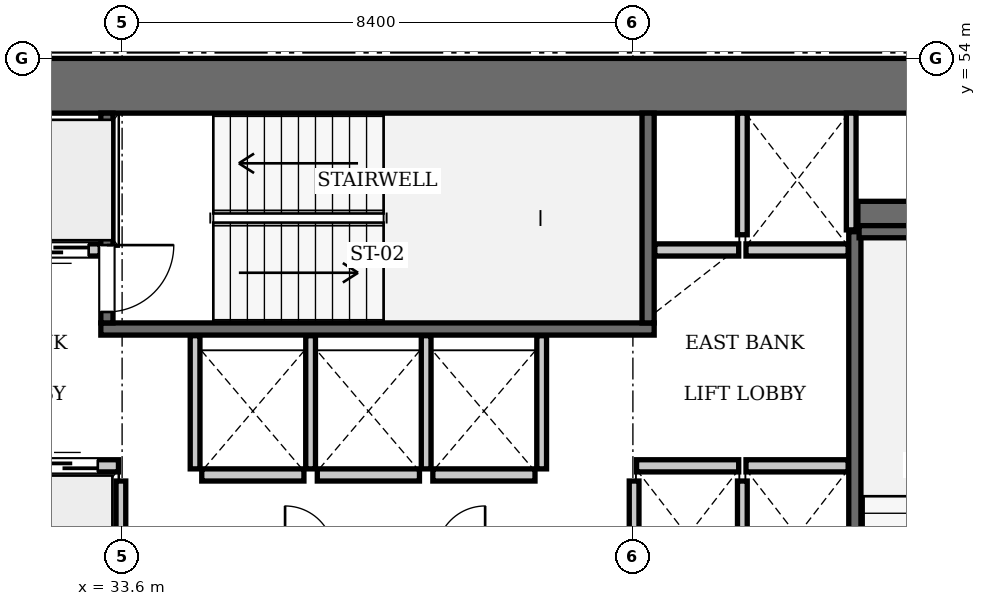
"""IFC4 building model, lengths in metres.
Left out: names, types, materials, properties, quantities, classifications, styles, units other than length and angle.
Written with IfcOpenShell. Run it as: python <this file> out.ifc"""

import sys

from ifc_helpers import new_model, si_unit, direction, frame, frame_2d, origin, place, context, subcontext, project, spatial, rectangle, extrude, element, fill, save


model = new_model("IFC4")
c1 = context("Model", 3, precision=1e-05, world=origin(), true_north=direction((0.0, 1.0)))
c2 = subcontext(c1, "Body", "Model", "MODEL_VIEW")
j1 = project(units=[si_unit("LENGTHUNIT", "METRE"), si_unit("PLANEANGLEUNIT", "RADIAN")], contexts=[c1])
p1 = place(None, origin())
s1 = spatial("IfcSite", under=j1, at=p1, CompositionType="ELEMENT")
p2 = place(p1, origin())
s2 = spatial("IfcBuilding", under=s1, at=p2, CompositionType="ELEMENT")
p3 = place(p2, frame((0.0, 0.0, 107.8)))
s3 = spatial("IfcBuildingStorey", under=s2, at=p3, CompositionType="ELEMENT", Elevation=107.8)
p4 = place(p3, frame((25.2, 53.55, 0.0), z_axis=(0.0, 0.0, 1.0), x_axis=(1.0, 0.0, 0.0)))
e1 = element("IfcWall", 1, at=p4, inside=s3, PredefinedType="SHEAR", context=c2, shape_type="SweptSolid", body=[
    extrude(rectangle(XDim=25.2, YDim=0.9, at=frame_2d((12.6, 0.0))), origin(), (0.0, 0.0, 1.0), 3.85),
])
p5 = place(p3, frame((45.7, 51.4, 0.0), z_axis=(0.0, 0.0, 1.0), x_axis=(1.0, 0.0, 0.0)))
e2 = element("IfcWall", 2, at=p5, inside=s3, PredefinedType="SHEAR", context=c2, shape_type="SweptSolid", body=[
    extrude(rectangle(XDim=3.8, YDim=0.5, at=frame_2d((1.9, 0.0))), origin(), (0.0, 0.0, 1.0), 3.85),
])
p6 = place(p3, frame((33.25, 49.55, 0.0), z_axis=(0.0, 0.0, 1.0), x_axis=(1.0, 0.0, 0.0)))
e3 = element("IfcWall", 3, at=p6, inside=s3, PredefinedType="SOLIDWALL", context=c2, shape_type="SweptSolid", body=[
    extrude(rectangle(XDim=9.1, YDim=0.2, at=frame_2d((4.55, 0.0))), origin(), (0.0, 0.0, 1.0), 3.61),
])
p7 = place(p3, frame((42.25, 49.65, 0.0), z_axis=(0.0, 0.0, 1.0), x_axis=(0.0, 1.0, 0.0)))
e4 = element("IfcWall", 4, at=p7, inside=s3, PredefinedType="SOLIDWALL", context=c2, shape_type="SweptSolid", body=[
    extrude(rectangle(XDim=3.45, YDim=0.2, at=frame_2d((1.725, 0.0))), origin(), (0.0, 0.0, 1.0), 3.61),
])
p8 = place(p3, frame((33.35, 49.65, 0.0), z_axis=(0.0, 0.0, 1.0), x_axis=(0.0, 1.0, 0.0)))
e5 = element("IfcWall", 5, at=p8, inside=s3, PredefinedType="SOLIDWALL", context=c2, shape_type="SweptSolid", body=[
    extrude(rectangle(XDim=3.45, YDim=0.2, at=frame_2d((1.725, 0.0))), origin(), (0.0, 0.0, 1.0), 3.61),
])
p9 = place(p8, frame((0.18, 0.0, 0.0)))
e6 = element("IfcOpeningElement", 6, at=p9, cuts=e5, PredefinedType="OPENING", context=c2, shape_type="SweptSolid", body=[
    extrude(rectangle(XDim=1.1, YDim=2.15, at=frame_2d((0.55, 1.075))), frame((0.0, 0.11, 0.0), z_axis=(0.0, -1.0, 0.0), x_axis=(1.0, 0.0, 0.0)), (0.0, 0.0, 1.0), 0.22),
])
p10 = place(p3, frame((45.65, 42.3, 0.0), z_axis=(0.0, 0.0, 1.0), x_axis=(0.0, 1.0, 0.0)))
e7 = element("IfcWall", 7, at=p10, inside=s3, PredefinedType="SOLIDWALL", context=c2, shape_type="SweptSolid", body=[
    extrude(rectangle(XDim=8.85, YDim=0.2, at=frame_2d((4.425, 0.0))), origin(), (0.0, 0.0, 1.0), 3.61),
])
p11 = place(p3, frame((45.72, 51.15, 0.0), z_axis=(0.0, 0.0, 1.0), x_axis=(1.0, 0.0, 0.0)))
e8 = element("IfcWall", 8, at=p11, inside=s3, PredefinedType="SOLIDWALL", context=c2, shape_type="SweptSolid", body=[
    extrude(rectangle(XDim=3.5, YDim=0.2, at=frame_2d((1.75, 0.0))), origin(), (0.0, 0.0, 1.0), 3.61),
])
p12 = place(p3, frame((31.86, 47.3, 0.0), z_axis=(0.0, 0.0, 1.0), x_axis=(1.0, 0.0, 0.0)))
e9 = element("IfcWall", 9, at=p12, inside=s3, PredefinedType="SOLIDWALL", context=c2, shape_type="SweptSolid", body=[
    extrude(rectangle(XDim=1.68, YDim=0.2, at=frame_2d((0.84, 0.0))), origin(), (0.0, 0.0, 1.0), 3.61),
])
p13 = place(p12, frame((0.34, 0.0, 0.0)))
e10 = element("IfcOpeningElement", 10, at=p13, cuts=e9, PredefinedType="OPENING", context=c2, shape_type="SweptSolid", body=[
    extrude(rectangle(XDim=1.0, YDim=2.15, at=frame_2d((0.5, 1.075))), frame((0.0, 0.11, 0.0), z_axis=(0.0, -1.0, 0.0), x_axis=(1.0, 0.0, 0.0)), (0.0, 0.0, 1.0), 0.22),
])
p14 = place(p3, frame((31.86, 50.85, 0.0), z_axis=(0.0, 0.0, 1.0), x_axis=(1.0, 0.0, 0.0)))
e11 = element("IfcWall", 11, at=p14, inside=s3, PredefinedType="SOLIDWALL", context=c2, shape_type="SweptSolid", body=[
    extrude(rectangle(XDim=1.38, YDim=0.2, at=frame_2d((0.69, 0.0))), origin(), (0.0, 0.0, 1.0), 3.61),
])
p15 = place(p14, frame((0.19, 0.0, 0.0)))
e12 = element("IfcOpeningElement", 12, at=p15, cuts=e11, PredefinedType="OPENING", context=c2, shape_type="SweptSolid", body=[
    extrude(rectangle(XDim=1.0, YDim=2.15, at=frame_2d((0.5, 1.075))), frame((0.0, 0.11, 0.0), z_axis=(0.0, -1.0, 0.0), x_axis=(1.0, 0.0, 0.0)), (0.0, 0.0, 1.0), 0.22),
])
for number, where, z_axis, x_axis in (
    (13, (42.06, 47.3, 0.0), (0.0, 0.0, 1.0), (1.0, 0.0, 0.0)),
    (14, (43.86, 47.3, 0.0), (0.0, 0.0, 1.0), (1.0, 0.0, 0.0)),
):
    element("IfcWall", number, at=place(p3, frame(where, z_axis=z_axis, x_axis=x_axis)), inside=s3, PredefinedType="SOLIDWALL", context=c2, shape_type="SweptSolid", body=[
        extrude(rectangle(XDim=1.68, YDim=0.2, at=frame_2d((0.84, 0.0))), origin(), (0.0, 0.0, 1.0), 3.61),
    ])
p16 = place(p3, frame((42.36, 50.85, 0.0), z_axis=(0.0, 0.0, 1.0), x_axis=(1.0, 0.0, 0.0)))
e15 = element("IfcWall", 15, at=p16, inside=s3, PredefinedType="SOLIDWALL", context=c2, shape_type="SweptSolid", body=[
    extrude(rectangle(XDim=1.38, YDim=0.2, at=frame_2d((0.69, 0.0))), origin(), (0.0, 0.0, 1.0), 3.61),
])
p17 = place(p3, frame((43.86, 50.85, 0.0), z_axis=(0.0, 0.0, 1.0), x_axis=(1.0, 0.0, 0.0)))
e16 = element("IfcWall", 16, at=p17, inside=s3, PredefinedType="SOLIDWALL", context=c2, shape_type="SweptSolid", body=[
    extrude(rectangle(XDim=1.68, YDim=0.2, at=frame_2d((0.84, 0.0))), origin(), (0.0, 0.0, 1.0), 3.61),
])
p18 = place(p3, frame((34.91, 47.15, 0.0), z_axis=(0.0, 0.0, 1.0), x_axis=(1.0, 0.0, 0.0)))
e17 = element("IfcWall", 17, at=p18, inside=s3, PredefinedType="SOLIDWALL", context=c2, shape_type="SweptSolid", body=[
    extrude(rectangle(XDim=1.68, YDim=0.2, at=frame_2d((0.84, 0.0))), origin(), (0.0, 0.0, 1.0), 3.61),
])
for number, where, z_axis, x_axis in (
    (18, (36.81, 47.15, 0.0), (0.0, 0.0, 1.0), (1.0, 0.0, 0.0)),
    (19, (38.71, 47.15, 0.0), (0.0, 0.0, 1.0), (1.0, 0.0, 0.0)),
):
    element("IfcWall", number, at=place(p3, frame(where, z_axis=z_axis, x_axis=x_axis)), inside=s3, PredefinedType="SOLIDWALL", context=c2, shape_type="SweptSolid", body=[
        extrude(rectangle(XDim=1.68, YDim=0.2, at=frame_2d((0.84, 0.0))), origin(), (0.0, 0.0, 1.0), 3.61),
    ])
for number, where, z_axis, x_axis in (
    (20, (33.58, 45.1, 0.0), (0.0, 0.0, 1.0), (0.0, 1.0, 0.0)),
    (21, (42.02, 45.1, 0.0), (0.0, 0.0, 1.0), (0.0, 1.0, 0.0)),
    (22, (43.8, 45.1, 0.0), (0.0, 0.0, 1.0), (0.0, 1.0, 0.0)),
):
    element("IfcWall", number, at=place(p3, frame(where, z_axis=z_axis, x_axis=x_axis)), inside=s3, PredefinedType="SOLIDWALL", context=c2, shape_type="SweptSolid", body=[
        extrude(rectangle(XDim=1.95, YDim=0.16, at=frame_2d((0.975, 0.0))), origin(), (0.0, 0.0, 1.0), 3.61),
    ])
p19 = place(p3, frame((45.59, 51.18, 0.0), z_axis=(0.0, 0.0, 1.0), x_axis=(0.0, 1.0, 0.0)))
e23 = element("IfcWall", 23, at=p19, inside=s3, PredefinedType="SOLIDWALL", context=c2, shape_type="SweptSolid", body=[
    extrude(rectangle(XDim=1.92, YDim=0.16, at=frame_2d((0.96, 0.0))), origin(), (0.0, 0.0, 1.0), 3.61),
])
p20 = place(p3, frame((43.8, 51.1, 0.0), z_axis=(0.0, 0.0, 1.0), x_axis=(0.0, 1.0, 0.0)))
e24 = element("IfcWall", 24, at=p20, inside=s3, PredefinedType="SOLIDWALL", context=c2, shape_type="SweptSolid", body=[
    extrude(rectangle(XDim=2.0, YDim=0.16, at=frame_2d((1.0, 0.0))), origin(), (0.0, 0.0, 1.0), 3.61),
])
for number, where, z_axis, x_axis in (
    (25, (34.8, 47.25, 0.0), (0.0, 0.0, 1.0), (0.0, 1.0, 0.0)),
    (26, (36.7, 47.25, 0.0), (0.0, 0.0, 1.0), (0.0, 1.0, 0.0)),
    (27, (38.6, 47.25, 0.0), (0.0, 0.0, 1.0), (0.0, 1.0, 0.0)),
    (28, (40.5, 47.25, 0.0), (0.0, 0.0, 1.0), (0.0, 1.0, 0.0)),
):
    element("IfcWall", number, at=place(p3, frame(where, z_axis=z_axis, x_axis=x_axis)), inside=s3, PredefinedType="SOLIDWALL", context=c2, shape_type="SweptSolid", body=[
        extrude(rectangle(XDim=2.19, YDim=0.16, at=frame_2d((1.095, 0.0))), origin(), (0.0, 0.0, 1.0), 3.61),
    ])
p21 = place(p9, frame((1.1, 0.0, 0.0), z_axis=(0.0, 0.0, 1.0), x_axis=(-1.0, 0.0, 0.0)))
e29 = element("IfcDoor", 29, at=p21, inside=s3, OperationType="SINGLE_SWING_LEFT", PredefinedType="DOOR", context=c2, shape_type="SweptSolid", body=[
    extrude(rectangle(XDim=1.1, YDim=2.15, at=frame_2d((0.55, 1.075))), frame((0.0, 0.025, 0.0), z_axis=(0.0, -1.0, 0.0), x_axis=(1.0, 0.0, 0.0)), (0.0, 0.0, 1.0), 0.05),
])
fill(e6, e29)
p22 = place(p13, origin())
e30 = element("IfcDoor", 30, at=p22, inside=s3, OperationType="SLIDING_TO_LEFT", PredefinedType="DOOR", context=c2, shape_type="SweptSolid", body=[
    extrude(rectangle(XDim=1.0, YDim=2.15, at=frame_2d((0.5, 1.075))), frame((0.0, 0.025, 0.0), z_axis=(0.0, -1.0, 0.0), x_axis=(1.0, 0.0, 0.0)), (0.0, 0.0, 1.0), 0.05),
])
fill(e10, e30)
p23 = place(p15, frame((1.0, 0.0, 0.0), z_axis=(0.0, 0.0, 1.0), x_axis=(-1.0, 0.0, 0.0)))
e31 = element("IfcDoor", 31, at=p23, inside=s3, OperationType="SLIDING_TO_LEFT", PredefinedType="DOOR", context=c2, shape_type="SweptSolid", body=[
    extrude(rectangle(XDim=1.0, YDim=2.15, at=frame_2d((0.5, 1.075))), frame((0.0, 0.025, 0.0), z_axis=(0.0, -1.0, 0.0), x_axis=(1.0, 0.0, 0.0)), (0.0, 0.0, 1.0), 0.05),
])
fill(e12, e31)
save(model, sys.argv[1])
